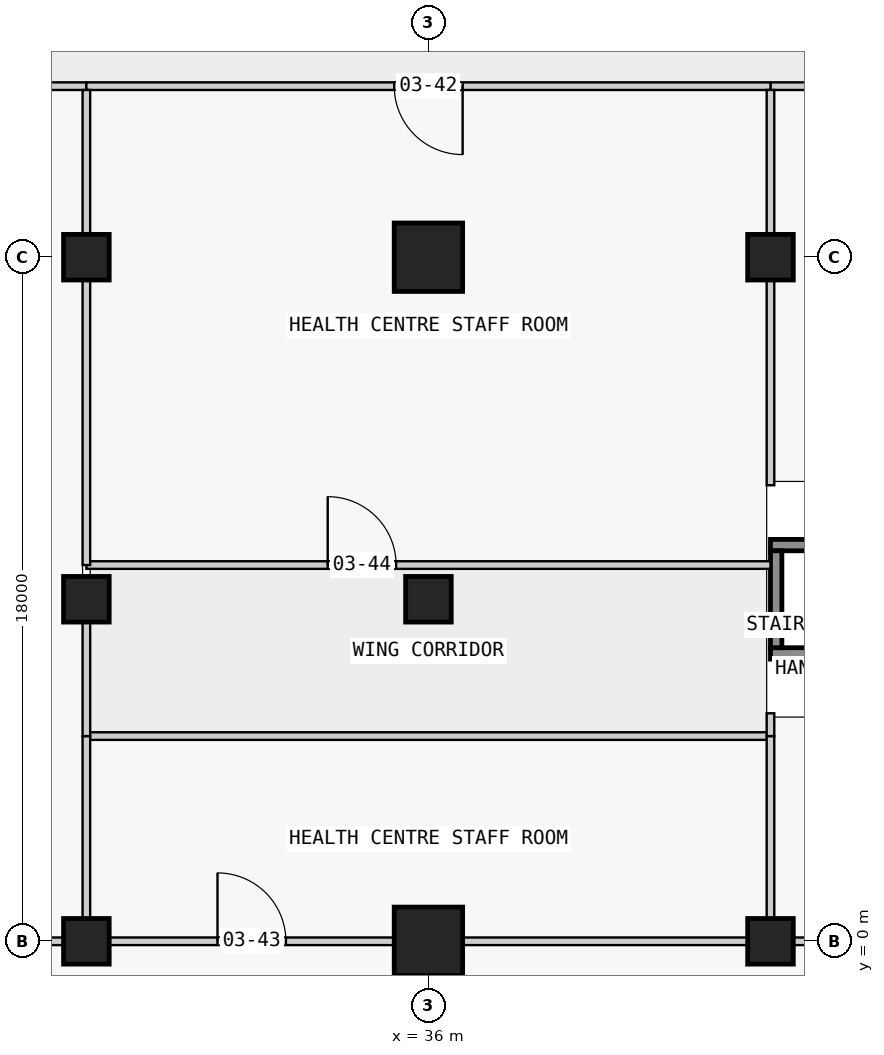
"""IFC4 building model, lengths in metres.
Left out: names, types, materials, properties, quantities, classifications, styles, units other than length and angle.
Written with IfcOpenShell. Run it as: python <this file> out.ifc"""

import sys

from ifc_helpers import new_model, si_unit, direction, frame, frame_2d, origin, origin_2d, place, context, subcontext, project, spatial, rectangle, extrude, element, fill, save


model = new_model("IFC4")
c1 = context("Model", 3, precision=1e-05, world=origin(), true_north=direction((0.0, 1.0)))
c2 = subcontext(c1, "Body", "Model", "MODEL_VIEW")
j1 = project(units=[si_unit("LENGTHUNIT", "METRE"), si_unit("PLANEANGLEUNIT", "RADIAN")], contexts=[c1])
p1 = place(None, origin())
s1 = spatial("IfcSite", under=j1, at=p1, CompositionType="ELEMENT")
p2 = place(p1, origin())
s2 = spatial("IfcBuilding", under=s1, at=p2, CompositionType="ELEMENT")
p3 = place(p2, frame((0.0, 0.0, 17.3)))
s3 = spatial("IfcBuildingStorey", under=s2, at=p3, CompositionType="ELEMENT", Elevation=17.3)
for number, where, z_axis, x_axis in (
    (1, (27.0, 0.0, 0.0), (0.0, 0.0, 1.0), (1.0, 0.0, 0.0)),
    (2, (27.0, 9.0, 0.0), (0.0, 0.0, 1.0), (1.0, 0.0, 0.0)),
    (3, (27.0, 18.0, 0.0), (0.0, 0.0, 1.0), (1.0, 0.0, 0.0)),
):
    element("IfcColumn", number, at=place(p3, frame(where, z_axis=z_axis, x_axis=x_axis)), inside=s3, PredefinedType="COLUMN", context=c2, shape_type="SweptSolid", body=[
        extrude(rectangle(XDim=1.2, YDim=1.2, at=origin_2d()), origin(), (0.0, 0.0, 1.0), 4.5),
    ])
p4 = place(p3, frame((36.0, 0.0, 0.0), z_axis=(0.0, 0.0, 1.0), x_axis=(1.0, 0.0, 0.0)))
e4 = element("IfcColumn", 4, at=p4, inside=s3, PredefinedType="COLUMN", context=c2, shape_type="SweptSolid", body=[
    extrude(rectangle(XDim=1.8, YDim=1.8, at=origin_2d()), origin(), (0.0, 0.0, 1.0), 4.5),
])
p5 = place(p3, frame((36.0, 9.0, 0.0), z_axis=(0.0, 0.0, 1.0), x_axis=(1.0, 0.0, 0.0)))
e5 = element("IfcColumn", 5, at=p5, inside=s3, PredefinedType="COLUMN", context=c2, shape_type="SweptSolid", body=[
    extrude(rectangle(XDim=1.2, YDim=1.2, at=origin_2d()), origin(), (0.0, 0.0, 1.0), 4.5),
])
p6 = place(p3, frame((36.0, 18.0, 0.0), z_axis=(0.0, 0.0, 1.0), x_axis=(1.0, 0.0, 0.0)))
e6 = element("IfcColumn", 6, at=p6, inside=s3, PredefinedType="COLUMN", context=c2, shape_type="SweptSolid", body=[
    extrude(rectangle(XDim=1.8, YDim=1.8, at=origin_2d()), origin(), (0.0, 0.0, 1.0), 4.5),
])
for number, where, z_axis, x_axis in (
    (7, (45.0, 0.0, 0.0), (0.0, 0.0, 1.0), (1.0, 0.0, 0.0)),
    (8, (45.0, 18.0, 0.0), (0.0, 0.0, 1.0), (1.0, 0.0, 0.0)),
):
    element("IfcColumn", number, at=place(p3, frame(where, z_axis=z_axis, x_axis=x_axis)), inside=s3, PredefinedType="COLUMN", context=c2, shape_type="SweptSolid", body=[
        extrude(rectangle(XDim=1.2, YDim=1.2, at=origin_2d()), origin(), (0.0, 0.0, 1.0), 4.5),
    ])
p7 = place(p3, frame((45.15, 7.725, 0.0), z_axis=(0.0, 0.0, 1.0), x_axis=(0.0, 1.0, 0.0)))
e9 = element("IfcWall", 9, at=p7, inside=s3, PredefinedType="SHEAR", context=c2, shape_type="SweptSolid", body=[
    extrude(rectangle(XDim=2.55, YDim=0.3, at=frame_2d((1.275, 0.0))), origin(), (0.0, 0.0, 1.0), 4.5),
])
for number, where, z_axis, x_axis in (
    (10, (45.0, 7.575, 0.0), (0.0, 0.0, 1.0), (1.0, 0.0, 0.0)),
    (11, (45.0, 10.425, 0.0), (0.0, 0.0, 1.0), (1.0, 0.0, 0.0)),
):
    element("IfcWall", number, at=place(p3, frame(where, z_axis=z_axis, x_axis=x_axis)), inside=s3, PredefinedType="SHEAR", context=c2, shape_type="SweptSolid", body=[
        extrude(rectangle(XDim=7.2, YDim=0.3, at=frame_2d((3.6, 0.0))), origin(), (0.0, 0.0, 1.0), 4.5),
    ])
p8 = place(p3, frame((45.6, 0.0, 0.0), z_axis=(0.0, 0.0, 1.0), x_axis=(1.0, 0.0, 0.0)))
e12 = element("IfcWall", 12, at=p8, inside=s3, PredefinedType="PARTITIONING", context=c2, shape_type="SweptSolid", body=[
    extrude(rectangle(XDim=7.5, YDim=0.2, at=frame_2d((3.75, 0.0))), origin(), (0.0, 0.0, 1.0), 4.15),
])
p9 = place(p8, frame((2.85, 0.0, 0.0)))
e13 = element("IfcOpeningElement", 13, at=p9, cuts=e12, PredefinedType="OPENING", context=c2, shape_type="SweptSolid", body=[
    extrude(rectangle(XDim=1.8, YDim=2.1, at=frame_2d((0.9, 1.05))), frame((0.0, 0.11, 0.0), z_axis=(0.0, -1.0, 0.0), x_axis=(1.0, 0.0, 0.0)), (0.0, 0.0, 1.0), 0.22),
])
p10 = place(p3, frame((72.0, 22.5, 0.0), z_axis=(0.0, 0.0, 1.0), x_axis=(-1.0, 0.0, 0.0)))
e14 = element("IfcWall", 14, at=p10, inside=s3, PredefinedType="PARTITIONING", context=c2, shape_type="SweptSolid", body=[
    extrude(rectangle(XDim=27.0, YDim=0.2, at=frame_2d((13.5, 0.0))), origin(), (0.0, 0.0, 1.0), 4.15),
])
p11 = place(p10, frame((12.6, 0.0, 0.0)))
e15 = element("IfcOpeningElement", 15, at=p11, cuts=e14, PredefinedType="OPENING", context=c2, shape_type="SweptSolid", body=[
    extrude(rectangle(XDim=1.8, YDim=2.1, at=frame_2d((0.9, 1.05))), frame((0.0, 0.11, 0.0), z_axis=(0.0, -1.0, 0.0), x_axis=(1.0, 0.0, 0.0)), (0.0, 0.0, 1.0), 0.22),
])
p12 = place(p3, frame((22.5, 22.5, 0.0), z_axis=(0.0, 0.0, 1.0), x_axis=(1.0, 0.0, 0.0)))
e16 = element("IfcWall", 16, at=p12, inside=s3, PredefinedType="PARTITIONING", context=c2, shape_type="SweptSolid", body=[
    extrude(rectangle(XDim=4.5, YDim=0.2, at=frame_2d((2.25, 0.0))), origin(), (0.0, 0.0, 1.0), 4.15),
])
p13 = place(p3, frame((45.0, 22.5, 0.0), z_axis=(0.0, 0.0, 1.0), x_axis=(-1.0, 0.0, 0.0)))
e17 = element("IfcWall", 17, at=p13, inside=s3, PredefinedType="PARTITIONING", context=c2, shape_type="SweptSolid", body=[
    extrude(rectangle(XDim=18.0, YDim=0.2, at=frame_2d((9.0, 0.0))), origin(), (0.0, 0.0, 1.0), 4.15),
])
p14 = place(p13, frame((8.1, 0.0, 0.0)))
e18 = element("IfcOpeningElement", 18, at=p14, cuts=e17, PredefinedType="OPENING", context=c2, shape_type="SweptSolid", body=[
    extrude(rectangle(XDim=1.8, YDim=2.1, at=frame_2d((0.9, 1.05))), frame((0.0, 0.11, 0.0), z_axis=(0.0, -1.0, 0.0), x_axis=(1.0, 0.0, 0.0)), (0.0, 0.0, 1.0), 0.22),
])
p15 = place(p3, frame((27.6, 0.0, 0.0), z_axis=(0.0, 0.0, 1.0), x_axis=(1.0, 0.0, 0.0)))
e19 = element("IfcWall", 19, at=p15, inside=s3, PredefinedType="PARTITIONING", context=c2, shape_type="SweptSolid", body=[
    extrude(rectangle(XDim=7.5, YDim=0.2, at=frame_2d((3.75, 0.0))), origin(), (0.0, 0.0, 1.0), 4.15),
])
p16 = place(p15, frame((2.85, 0.0, 0.0)))
e20 = element("IfcOpeningElement", 20, at=p16, cuts=e19, PredefinedType="OPENING", context=c2, shape_type="SweptSolid", body=[
    extrude(rectangle(XDim=1.8, YDim=2.1, at=frame_2d((0.9, 1.05))), frame((0.0, 0.11, 0.0), z_axis=(0.0, -1.0, 0.0), x_axis=(1.0, 0.0, 0.0)), (0.0, 0.0, 1.0), 0.22),
])
p17 = place(p3, frame((36.9, 0.0, 0.0), z_axis=(0.0, 0.0, 1.0), x_axis=(1.0, 0.0, 0.0)))
e21 = element("IfcWall", 21, at=p17, inside=s3, PredefinedType="PARTITIONING", context=c2, shape_type="SweptSolid", body=[
    extrude(rectangle(XDim=7.5, YDim=0.2, at=frame_2d((3.75, 0.0))), origin(), (0.0, 0.0, 1.0), 4.15),
])
p18 = place(p3, frame((27.0, 9.9, 0.0), z_axis=(0.0, 0.0, 1.0), x_axis=(1.0, 0.0, 0.0)))
e22 = element("IfcWall", 22, at=p18, inside=s3, PredefinedType="PARTITIONING", context=c2, shape_type="SweptSolid", body=[
    extrude(rectangle(XDim=18.0, YDim=0.2, at=frame_2d((9.0, 0.0))), origin(), (0.0, 0.0, 1.0), 4.15),
])
p19 = place(p18, frame((6.35, 0.0, 0.0)))
e23 = element("IfcOpeningElement", 23, at=p19, cuts=e22, PredefinedType="OPENING", context=c2, shape_type="SweptSolid", body=[
    extrude(rectangle(XDim=1.8, YDim=2.1, at=frame_2d((0.9, 1.05))), frame((0.0, 0.11, 0.0), z_axis=(0.0, -1.0, 0.0), x_axis=(1.0, 0.0, 0.0)), (0.0, 0.0, 1.0), 0.22),
])
p20 = place(p3, frame((45.0, 5.4, 0.0), z_axis=(0.0, 0.0, 1.0), x_axis=(-1.0, 0.0, 0.0)))
e24 = element("IfcWall", 24, at=p20, inside=s3, PredefinedType="PARTITIONING", context=c2, shape_type="SweptSolid", body=[
    extrude(rectangle(XDim=18.0, YDim=0.2, at=frame_2d((9.0, 0.0))), origin(), (0.0, 0.0, 1.0), 4.15),
])
p21 = place(p3, frame((27.0, 22.4, 0.0), z_axis=(0.0, 0.0, 1.0), x_axis=(0.0, -1.0, 0.0)))
e25 = element("IfcWall", 25, at=p21, inside=s3, PredefinedType="PARTITIONING", context=c2, shape_type="SweptSolid", body=[
    extrude(rectangle(XDim=3.8, YDim=0.2, at=frame_2d((1.9, 0.0))), origin(), (0.0, 0.0, 1.0), 4.15),
])
p22 = place(p3, frame((27.0, 17.4, 0.0), z_axis=(0.0, 0.0, 1.0), x_axis=(0.0, -1.0, 0.0)))
e26 = element("IfcWall", 26, at=p22, inside=s3, PredefinedType="PARTITIONING", context=c2, shape_type="SweptSolid", body=[
    extrude(rectangle(XDim=7.5, YDim=0.2, at=frame_2d((3.75, 0.0))), origin(), (0.0, 0.0, 1.0), 4.15),
])
p23 = place(p3, frame((45.0, 22.4, 0.0), z_axis=(0.0, 0.0, 1.0), x_axis=(0.0, -1.0, 0.0)))
e27 = element("IfcWall", 27, at=p23, inside=s3, PredefinedType="PARTITIONING", context=c2, shape_type="SweptSolid", body=[
    extrude(rectangle(XDim=3.8, YDim=0.2, at=frame_2d((1.9, 0.0))), origin(), (0.0, 0.0, 1.0), 4.15),
])
p24 = place(p3, frame((45.0, 17.4, 0.0), z_axis=(0.0, 0.0, 1.0), x_axis=(0.0, -1.0, 0.0)))
e28 = element("IfcWall", 28, at=p24, inside=s3, PredefinedType="PARTITIONING", context=c2, shape_type="SweptSolid", body=[
    extrude(rectangle(XDim=5.4, YDim=0.2, at=frame_2d((2.7, 0.0))), origin(), (0.0, 0.0, 1.0), 4.15),
])
for number, where, z_axis, x_axis in (
    (29, (27.0, 5.4, 0.0), (0.0, 0.0, 1.0), (0.0, -1.0, 0.0)),
    (30, (45.0, 5.4, 0.0), (0.0, 0.0, 1.0), (0.0, -1.0, 0.0)),
):
    element("IfcWall", number, at=place(p3, frame(where, z_axis=z_axis, x_axis=x_axis)), inside=s3, PredefinedType="PARTITIONING", context=c2, shape_type="SweptSolid", body=[
        extrude(rectangle(XDim=4.8, YDim=0.2, at=frame_2d((2.4, 0.0))), origin(), (0.0, 0.0, 1.0), 4.15),
    ])
p25 = place(p3, frame((27.0, 8.4, 0.0), z_axis=(0.0, 0.0, 1.0), x_axis=(0.0, -1.0, 0.0)))
e31 = element("IfcWall", 31, at=p25, inside=s3, PredefinedType="PARTITIONING", context=c2, shape_type="SweptSolid", body=[
    extrude(rectangle(XDim=3.0, YDim=0.2, at=frame_2d((1.5, 0.0))), origin(), (0.0, 0.0, 1.0), 4.15),
])
p26 = place(p3, frame((26.4, 0.0, 0.0), z_axis=(0.0, 0.0, 1.0), x_axis=(-1.0, 0.0, 0.0)))
e32 = element("IfcWall", 32, at=p26, inside=s3, PredefinedType="PARTITIONING", context=c2, shape_type="SweptSolid", body=[
    extrude(rectangle(XDim=3.9, YDim=0.2, at=frame_2d((1.95, 0.0))), origin(), (0.0, 0.0, 1.0), 4.15),
])
p27 = place(p3, frame((45.0, 6.0, 0.0), z_axis=(0.0, 0.0, 1.0), x_axis=(0.0, -1.0, 0.0)))
e33 = element("IfcWall", 33, at=p27, inside=s3, PredefinedType="PARTITIONING", context=c2, shape_type="SweptSolid", body=[
    extrude(rectangle(XDim=0.6, YDim=0.2, at=frame_2d((0.3, 0.0))), origin(), (0.0, 0.0, 1.0), 4.15),
])
p28 = place(p14, origin())
e34 = element("IfcDoor", 34, at=p28, inside=s3, OperationType="DOUBLE_DOOR_SINGLE_SWING", PredefinedType="DOOR", context=c2, shape_type="SweptSolid", body=[
    extrude(rectangle(XDim=1.8, YDim=2.1, at=frame_2d((0.9, 1.05))), frame((0.0, 0.025, 0.0), z_axis=(0.0, -1.0, 0.0), x_axis=(1.0, 0.0, 0.0)), (0.0, 0.0, 1.0), 0.05),
])
fill(e18, e34)
p29 = place(p16, origin())
e35 = element("IfcDoor", 35, at=p29, inside=s3, OperationType="DOUBLE_DOOR_SINGLE_SWING", PredefinedType="DOOR", context=c2, shape_type="SweptSolid", body=[
    extrude(rectangle(XDim=1.8, YDim=2.1, at=frame_2d((0.9, 1.05))), frame((0.0, 0.025, 0.0), z_axis=(0.0, -1.0, 0.0), x_axis=(1.0, 0.0, 0.0)), (0.0, 0.0, 1.0), 0.05),
])
fill(e20, e35)
p30 = place(p19, origin())
e36 = element("IfcDoor", 36, at=p30, inside=s3, OperationType="DOUBLE_DOOR_SINGLE_SWING", PredefinedType="DOOR", context=c2, shape_type="SweptSolid", body=[
    extrude(rectangle(XDim=1.8, YDim=2.1, at=frame_2d((0.9, 1.05))), frame((0.0, 0.025, 0.0), z_axis=(0.0, -1.0, 0.0), x_axis=(1.0, 0.0, 0.0)), (0.0, 0.0, 1.0), 0.05),
])
fill(e23, e36)
save(model, sys.argv[1])
